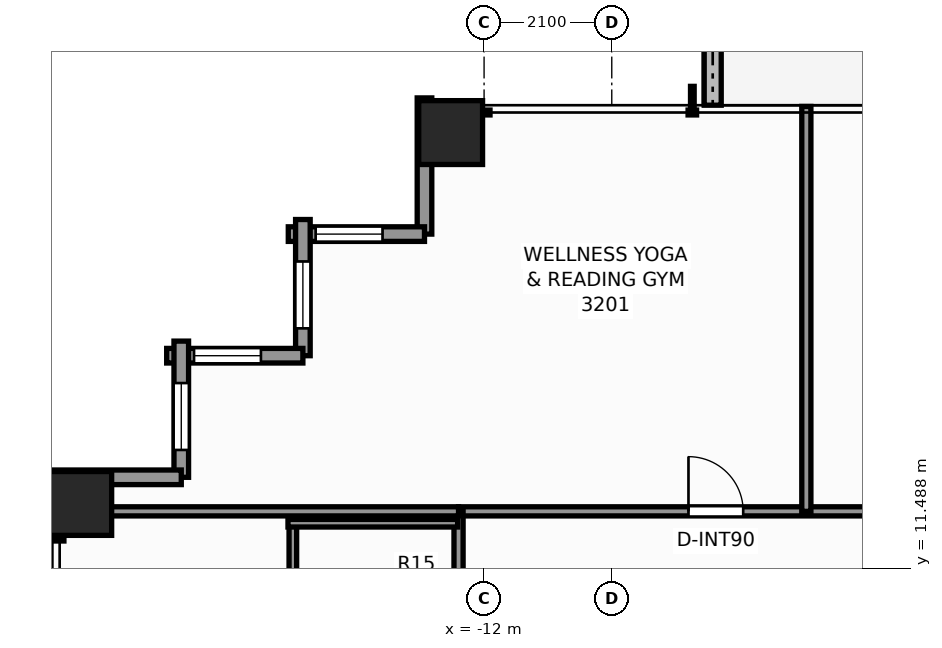
"""IFC4 building model, lengths in metres.
Left out: names, types, materials, properties, quantities, classifications, styles, units other than length and angle.
Written with IfcOpenShell. Run it as: python <this file> out.ifc"""

import sys

from ifc_helpers import new_model, si_unit, direction, frame, frame_2d, origin, origin_2d, place, context, subcontext, project, spatial, rectangle, extrude, element, fill, save


model = new_model("IFC4")
c1 = context("Model", 3, precision=1e-05, world=origin(), true_north=direction((0.0, 1.0)))
c2 = subcontext(c1, "Body", "Model", "MODEL_VIEW")
j1 = project(units=[si_unit("LENGTHUNIT", "METRE"), si_unit("PLANEANGLEUNIT", "RADIAN")], contexts=[c1])
p1 = place(None, origin())
s1 = spatial("IfcSite", under=j1, at=p1, CompositionType="ELEMENT")
p2 = place(p1, origin())
s2 = spatial("IfcBuilding", under=s1, at=p2, CompositionType="ELEMENT")
p3 = place(p2, frame((0.0, 0.0, 111.8)))
s3 = spatial("IfcBuildingStorey", under=s2, at=p3, CompositionType="ELEMENT", Elevation=111.8)
for number, where, z_axis, x_axis in (
    (1, (-12.55, 18.65, 0.0), (0.0, 0.0, 1.0), (1.0, 0.0, 0.0)),
    (2, (-18.65, 12.55, 0.0), (0.0, 0.0, 1.0), (1.0, 0.0, 0.0)),
):
    element("IfcColumn", number, at=place(p3, frame(where, z_axis=z_axis, x_axis=x_axis)), inside=s3, PredefinedType="COLUMN", context=c2, shape_type="SweptSolid", body=[
        extrude(rectangle(XDim=1.05, YDim=1.05, at=origin_2d()), origin(), (0.0, 0.0, 1.0), 3.3),
    ])
p4 = place(p3, frame((-8.24, 22.075, -0.04), z_axis=(0.0, 0.0, 1.0), x_axis=(0.0, -1.0, 0.0)))
e3 = element("IfcWall", 3, at=p4, inside=s3, PredefinedType="PARAPET", context=c2, shape_type="SweptSolid", body=[
    extrude(rectangle(XDim=2.975, YDim=0.28, at=frame_2d((1.487, 0.0))), origin(), (0.0, 0.0, 1.0), 0.42),
])
p5 = place(p3, frame((-12.98, 16.98, 0.0), z_axis=(0.0, 0.0, 1.0), x_axis=(0.0, 1.0, 0.0)))
e4 = element("IfcWall", 4, at=p5, inside=s3, PredefinedType="STANDARD", context=c2, shape_type="SweptSolid", body=[
    extrude(rectangle(XDim=2.24, YDim=0.24, at=frame_2d((1.12, 0.0))), origin(), (0.0, 0.0, 1.0), 2.459),
])
p6 = place(p3, frame((-15.22, 16.98, 0.0), z_axis=(0.0, 0.0, 1.0), x_axis=(1.0, 0.0, 0.0)))
e5 = element("IfcWall", 5, at=p6, inside=s3, PredefinedType="STANDARD", context=c2, shape_type="SweptSolid", body=[
    extrude(rectangle(XDim=2.24, YDim=0.24, at=frame_2d((1.12, 0.0))), origin(), (0.0, 0.0, 1.0), 2.459),
])
p7 = place(p6, frame((0.45, 0.0, 0.65)))
e6 = element("IfcOpeningElement", 6, at=p7, cuts=e5, PredefinedType="OPENING", context=c2, shape_type="SweptSolid", body=[
    extrude(rectangle(XDim=1.1, YDim=1.45, at=frame_2d((0.55, 0.725))), frame((0.0, 0.13, 0.0), z_axis=(0.0, -1.0, 0.0), x_axis=(1.0, 0.0, 0.0)), (0.0, 0.0, 1.0), 0.26),
])
p8 = place(p3, frame((-14.98, 14.98, 0.0), z_axis=(0.0, 0.0, 1.0), x_axis=(0.0, 1.0, 0.0)))
e7 = element("IfcWall", 7, at=p8, inside=s3, PredefinedType="STANDARD", context=c2, shape_type="SweptSolid", body=[
    extrude(rectangle(XDim=2.24, YDim=0.24, at=frame_2d((1.12, 0.0))), origin(), (0.0, 0.0, 1.0), 2.459),
])
p9 = place(p8, frame((0.45, 0.0, 0.65)))
e8 = element("IfcOpeningElement", 8, at=p9, cuts=e7, PredefinedType="OPENING", context=c2, shape_type="SweptSolid", body=[
    extrude(rectangle(XDim=1.1, YDim=1.45, at=frame_2d((0.55, 0.725))), frame((0.0, 0.13, 0.0), z_axis=(0.0, -1.0, 0.0), x_axis=(1.0, 0.0, 0.0)), (0.0, 0.0, 1.0), 0.26),
])
p10 = place(p3, frame((-17.22, 14.98, 0.0), z_axis=(0.0, 0.0, 1.0), x_axis=(1.0, 0.0, 0.0)))
e9 = element("IfcWall", 9, at=p10, inside=s3, PredefinedType="STANDARD", context=c2, shape_type="SweptSolid", body=[
    extrude(rectangle(XDim=2.24, YDim=0.24, at=frame_2d((1.12, 0.0))), origin(), (0.0, 0.0, 1.0), 2.459),
])
p11 = place(p10, frame((0.45, 0.0, 0.65)))
e10 = element("IfcOpeningElement", 10, at=p11, cuts=e9, PredefinedType="OPENING", context=c2, shape_type="SweptSolid", body=[
    extrude(rectangle(XDim=1.1, YDim=1.45, at=frame_2d((0.55, 0.725))), frame((0.0, 0.13, 0.0), z_axis=(0.0, -1.0, 0.0), x_axis=(1.0, 0.0, 0.0)), (0.0, 0.0, 1.0), 0.26),
])
p12 = place(p3, frame((-16.98, 12.98, 0.0), z_axis=(0.0, 0.0, 1.0), x_axis=(0.0, 1.0, 0.0)))
e11 = element("IfcWall", 11, at=p12, inside=s3, PredefinedType="STANDARD", context=c2, shape_type="SweptSolid", body=[
    extrude(rectangle(XDim=2.24, YDim=0.24, at=frame_2d((1.12, 0.0))), origin(), (0.0, 0.0, 1.0), 2.459),
])
p13 = place(p12, frame((0.45, 0.0, 0.65)))
e12 = element("IfcOpeningElement", 12, at=p13, cuts=e11, PredefinedType="OPENING", context=c2, shape_type="SweptSolid", body=[
    extrude(rectangle(XDim=1.1, YDim=1.45, at=frame_2d((0.55, 0.725))), frame((0.0, 0.13, 0.0), z_axis=(0.0, -1.0, 0.0), x_axis=(1.0, 0.0, 0.0)), (0.0, 0.0, 1.0), 0.26),
])
p14 = place(p3, frame((-19.22, 12.98, 0.0), z_axis=(0.0, 0.0, 1.0), x_axis=(1.0, 0.0, 0.0)))
e13 = element("IfcWall", 13, at=p14, inside=s3, PredefinedType="STANDARD", context=c2, shape_type="SweptSolid", body=[
    extrude(rectangle(XDim=2.24, YDim=0.24, at=frame_2d((1.12, 0.0))), origin(), (0.0, 0.0, 1.0), 2.459),
])
p15 = place(p3, frame((-12.42, 12.42, 0.0), z_axis=(0.0, 0.0, 1.0), x_axis=(1.0, 0.0, 0.0)))
e14 = element("IfcWall", 14, at=p15, inside=s3, PredefinedType="PARTITIONING", context=c2, shape_type="SweptSolid", body=[
    extrude(rectangle(XDim=24.68, YDim=0.15, at=frame_2d((12.34, 0.0))), origin(), (0.0, 0.0, 1.0), 2.292),
])
p16 = place(p15, frame((3.781, 0.0, 0.0)))
e15 = element("IfcOpeningElement", 15, at=p16, cuts=e14, PredefinedType="OPENING", context=c2, shape_type="SweptSolid", body=[
    extrude(rectangle(XDim=0.9, YDim=2.06, at=frame_2d((0.45, 1.03))), frame((0.0, 0.085, 0.0), z_axis=(0.0, -1.0, 0.0), x_axis=(1.0, 0.0, 0.0)), (0.0, 0.0, 1.0), 0.17),
])
p17 = place(p15, frame((8.773, 0.0, 0.0)))
e16 = element("IfcOpeningElement", 16, at=p17, cuts=e14, PredefinedType="OPENING", context=c2, shape_type="SweptSolid", body=[
    extrude(rectangle(XDim=0.9, YDim=2.06, at=frame_2d((0.45, 1.03))), frame((0.0, 0.085, 0.0), z_axis=(0.0, -1.0, 0.0), x_axis=(1.0, 0.0, 0.0)), (0.0, 0.0, 1.0), 0.17),
])
p18 = place(p15, frame((10.656, 0.0, 0.0)))
e17 = element("IfcOpeningElement", 17, at=p18, cuts=e14, PredefinedType="OPENING", context=c2, shape_type="SweptSolid", body=[
    extrude(rectangle(XDim=0.9, YDim=2.06, at=frame_2d((0.45, 1.03))), frame((0.0, 0.085, 0.0), z_axis=(0.0, -1.0, 0.0), x_axis=(1.0, 0.0, 0.0)), (0.0, 0.0, 1.0), 0.17),
])
p19 = place(p15, frame((13.773, 0.0, 0.0)))
e18 = element("IfcOpeningElement", 18, at=p19, cuts=e14, PredefinedType="OPENING", context=c2, shape_type="SweptSolid", body=[
    extrude(rectangle(XDim=0.95, YDim=2.06, at=frame_2d((0.475, 1.03))), frame((0.0, 0.085, 0.0), z_axis=(0.0, -1.0, 0.0), x_axis=(1.0, 0.0, 0.0)), (0.0, 0.0, 1.0), 0.17),
])
p20 = place(p15, frame((18.0, 0.0, 0.0)))
e19 = element("IfcOpeningElement", 19, at=p20, cuts=e14, PredefinedType="OPENING", context=c2, shape_type="SweptSolid", body=[
    extrude(rectangle(XDim=0.9, YDim=2.06, at=frame_2d((0.45, 1.03))), frame((0.0, 0.085, 0.0), z_axis=(0.0, -1.0, 0.0), x_axis=(1.0, 0.0, 0.0)), (0.0, 0.0, 1.0), 0.17),
])
p21 = place(p15, frame((19.861, 0.0, 0.0)))
e20 = element("IfcOpeningElement", 20, at=p21, cuts=e14, PredefinedType="OPENING", context=c2, shape_type="SweptSolid", body=[
    extrude(rectangle(XDim=0.95, YDim=2.06, at=frame_2d((0.475, 1.03))), frame((0.0, 0.085, 0.0), z_axis=(0.0, -1.0, 0.0), x_axis=(1.0, 0.0, 0.0)), (0.0, 0.0, 1.0), 0.17),
])
p22 = place(p3, frame((-12.42, 7.4, 0.0), z_axis=(0.0, 0.0, 1.0), x_axis=(0.0, 1.0, 0.0)))
e21 = element("IfcWall", 21, at=p22, inside=s3, PredefinedType="PARTITIONING", context=c2, shape_type="SweptSolid", body=[
    extrude(rectangle(XDim=5.02, YDim=0.15, at=frame_2d((2.51, 0.0))), origin(), (0.0, 0.0, 1.0), 2.292),
])
p23 = place(p22, frame((0.764, 0.0, 0.0)))
e22 = element("IfcOpeningElement", 22, at=p23, cuts=e21, PredefinedType="OPENING", context=c2, shape_type="SweptSolid", body=[
    extrude(rectangle(XDim=0.95, YDim=2.06, at=frame_2d((0.475, 1.03))), frame((0.0, 0.085, 0.0), z_axis=(0.0, -1.0, 0.0), x_axis=(1.0, 0.0, 0.0)), (0.0, 0.0, 1.0), 0.17),
])
p24 = place(p3, frame((-19.08, 12.42, 0.0), z_axis=(0.0, 0.0, 1.0), x_axis=(1.0, 0.0, 0.0)))
e23 = element("IfcWall", 23, at=p24, inside=s3, PredefinedType="PARTITIONING", context=c2, shape_type="SweptSolid", body=[
    extrude(rectangle(XDim=6.66, YDim=0.15, at=frame_2d((3.33, 0.0))), origin(), (0.0, 0.0, 1.0), 2.292),
])
p25 = place(p3, frame((-6.7, 12.42, 0.0), z_axis=(0.0, 0.0, 1.0), x_axis=(0.0, 1.0, 0.0)))
e24 = element("IfcWall", 24, at=p25, inside=s3, PredefinedType="PARTITIONING", context=c2, shape_type="SweptSolid", body=[
    extrude(rectangle(XDim=6.66, YDim=0.15, at=frame_2d((3.33, 0.0))), origin(), (0.0, 0.0, 1.0), 2.449),
])
p26 = place(p3, frame((-15.145, 9.915, 0.0), z_axis=(0.0, 0.0, 1.0), x_axis=(0.0, 1.0, 0.0)))
e25 = element("IfcWall", 25, at=p26, inside=s3, PredefinedType="PARTITIONING", context=c2, shape_type="SweptSolid", body=[
    extrude(rectangle(XDim=2.37, YDim=0.125, at=frame_2d((1.185, 0.0))), origin(), (0.0, 0.0, 1.0), 2.292),
])
p27 = place(p3, frame((-15.225, 12.225, 0.0), z_axis=(0.0, 0.0, 1.0), x_axis=(1.0, 0.0, 0.0)))
e26 = element("IfcWall", 26, at=p27, inside=s3, PredefinedType="PARTITIONING", context=c2, shape_type="SweptSolid", body=[
    extrude(rectangle(XDim=2.79, YDim=0.125, at=frame_2d((1.395, 0.0))), origin(), (0.0, 0.0, 1.0), 3.08),
])
p28 = place(p7, origin())
e27 = element("IfcWindow", 27, at=p28, inside=s3, PartitioningType="SINGLE_PANEL", PredefinedType="WINDOW", context=c2, shape_type="SweptSolid", body=[
    extrude(rectangle(XDim=1.1, YDim=1.45, at=frame_2d((0.55, 0.725))), frame((0.0, 0.03, 0.0), z_axis=(0.0, -1.0, 0.0), x_axis=(1.0, 0.0, 0.0)), (0.0, 0.0, 1.0), 0.06),
])
fill(e6, e27)
p29 = place(p9, origin())
e28 = element("IfcWindow", 28, at=p29, inside=s3, PartitioningType="SINGLE_PANEL", PredefinedType="WINDOW", context=c2, shape_type="SweptSolid", body=[
    extrude(rectangle(XDim=1.1, YDim=1.45, at=frame_2d((0.55, 0.725))), frame((0.0, 0.03, 0.0), z_axis=(0.0, -1.0, 0.0), x_axis=(1.0, 0.0, 0.0)), (0.0, 0.0, 1.0), 0.06),
])
fill(e8, e28)
p30 = place(p11, origin())
e29 = element("IfcWindow", 29, at=p30, inside=s3, PartitioningType="SINGLE_PANEL", PredefinedType="WINDOW", context=c2, shape_type="SweptSolid", body=[
    extrude(rectangle(XDim=1.1, YDim=1.45, at=frame_2d((0.55, 0.725))), frame((0.0, 0.03, 0.0), z_axis=(0.0, -1.0, 0.0), x_axis=(1.0, 0.0, 0.0)), (0.0, 0.0, 1.0), 0.06),
])
fill(e10, e29)
p31 = place(p13, origin())
e30 = element("IfcWindow", 30, at=p31, inside=s3, PartitioningType="SINGLE_PANEL", PredefinedType="WINDOW", context=c2, shape_type="SweptSolid", body=[
    extrude(rectangle(XDim=1.1, YDim=1.45, at=frame_2d((0.55, 0.725))), frame((0.0, 0.03, 0.0), z_axis=(0.0, -1.0, 0.0), x_axis=(1.0, 0.0, 0.0)), (0.0, 0.0, 1.0), 0.06),
])
fill(e12, e30)
p32 = place(p16, origin())
e31 = element("IfcDoor", 31, at=p32, inside=s3, OperationType="SINGLE_SWING_LEFT", PredefinedType="DOOR", context=c2, shape_type="SweptSolid", body=[
    extrude(rectangle(XDim=0.9, YDim=2.06, at=frame_2d((0.45, 1.03))), frame((0.0, 0.025, 0.0), z_axis=(0.0, -1.0, 0.0), x_axis=(1.0, 0.0, 0.0)), (0.0, 0.0, 1.0), 0.05),
])
fill(e15, e31)
save(model, sys.argv[1])
